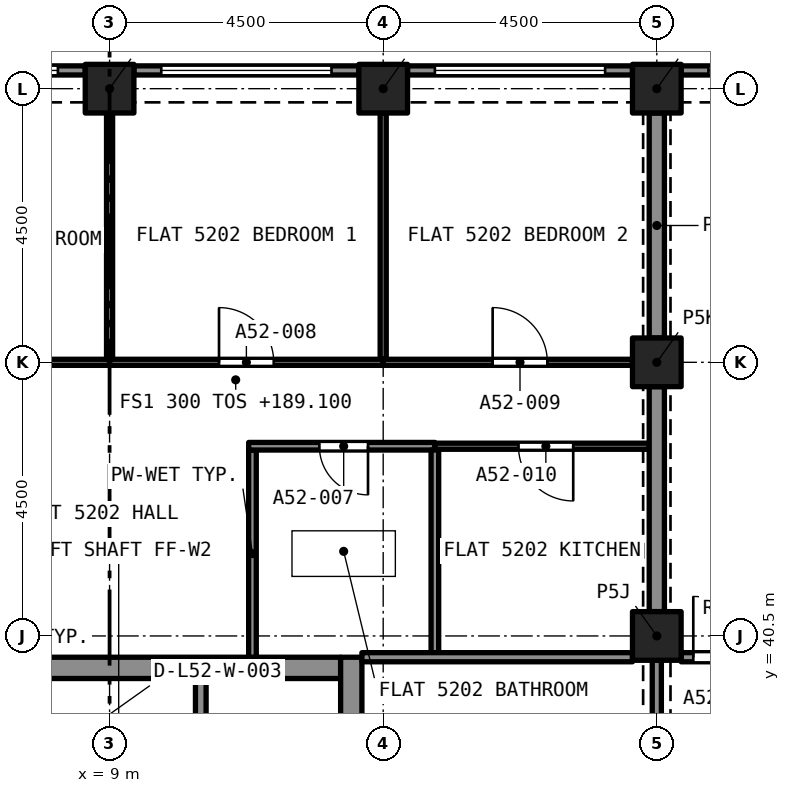
"""IFC4 building model, lengths in metres.
Left out: names, types, materials, properties, quantities, classifications, styles, units other than length and angle.
Written with IfcOpenShell. Run it as: python <this file> out.ifc"""

import sys

from ifc_helpers import new_model, si_unit, direction, frame, frame_2d, origin, origin_2d, place, context, subcontext, project, spatial, rectangle, extrude, element, fill, save


model = new_model("IFC4")
c1 = context("Model", 3, precision=1e-05, world=origin(), true_north=direction((0.0, 1.0)))
c2 = subcontext(c1, "Body", "Model", "MODEL_VIEW")
j1 = project(units=[si_unit("LENGTHUNIT", "METRE"), si_unit("PLANEANGLEUNIT", "RADIAN")], contexts=[c1])
p1 = place(None, origin())
s1 = spatial("IfcSite", under=j1, at=p1, CompositionType="ELEMENT")
p2 = place(p1, origin())
s2 = spatial("IfcBuilding", under=s1, at=p2, CompositionType="ELEMENT")
p3 = place(p2, frame((0.0, 0.0, 189.1)))
s3 = spatial("IfcBuildingStorey", under=s2, at=p3, CompositionType="ELEMENT", Elevation=189.1)
for number, where, z_axis, x_axis in (
    (1, (18.0, 40.5, 0.0), (0.0, 0.0, 1.0), (1.0, 0.0, 0.0)),
    (2, (18.0, 45.0, 0.0), (0.0, 0.0, 1.0), (1.0, 0.0, 0.0)),
    (3, (9.0, 49.5, 0.0), (0.0, 0.0, 1.0), (1.0, 0.0, 0.0)),
    (4, (13.5, 49.5, 0.0), (0.0, 0.0, 1.0), (1.0, 0.0, 0.0)),
    (5, (18.0, 49.5, 0.0), (0.0, 0.0, 1.0), (1.0, 0.0, 0.0)),
):
    element("IfcColumn", number, at=place(p3, frame(where, z_axis=z_axis, x_axis=x_axis)), inside=s3, PredefinedType="COLUMN", context=c2, shape_type="SweptSolid", body=[
        extrude(rectangle(XDim=0.8, YDim=0.8, at=origin_2d()), origin(), (0.0, 0.0, 1.0), 3.2),
    ])
p4 = place(p3, frame((5.2, 39.975, 0.0), z_axis=(0.0, 0.0, 1.0), x_axis=(1.0, 0.0, 0.0)))
e6 = element("IfcWall", 6, at=p4, inside=s3, PredefinedType="SOLIDWALL", context=c2, shape_type="SweptSolid", body=[
    extrude(rectangle(XDim=7.6, YDim=0.35, at=frame_2d((3.8, 0.0))), origin(), (0.0, 0.0, 1.0), 3.2),
])
p5 = place(p3, frame((12.975, 27.35, 0.0), z_axis=(0.0, 0.0, 1.0), x_axis=(0.0, 1.0, 0.0)))
e7 = element("IfcWall", 7, at=p5, inside=s3, PredefinedType="SOLIDWALL", context=c2, shape_type="SweptSolid", body=[
    extrude(rectangle(XDim=12.8, YDim=0.35, at=frame_2d((6.4, 0.0))), origin(), (0.0, 0.0, 1.0), 3.2),
])
p6 = place(p5, frame((10.75, 0.0, 0.0)))
e8 = element("IfcOpeningElement", 8, at=p6, cuts=e7, PredefinedType="OPENING", context=c2, shape_type="SweptSolid", body=[
    extrude(rectangle(XDim=1.1, YDim=2.1, at=frame_2d((0.55, 1.05))), frame((0.0, 0.185, 0.0), z_axis=(0.0, -1.0, 0.0), x_axis=(1.0, 0.0, 0.0)), (0.0, 0.0, 1.0), 0.37),
])
p7 = place(p5, frame((8.6, 0.0, 0.0)))
e9 = element("IfcOpeningElement", 9, at=p7, cuts=e7, PredefinedType="OPENING", context=c2, shape_type="SweptSolid", body=[
    extrude(rectangle(XDim=1.2, YDim=2.1, at=frame_2d((0.6, 1.05))), frame((0.0, 0.185, 0.0), z_axis=(0.0, -1.0, 0.0), x_axis=(1.0, 0.0, 0.0)), (0.0, 0.0, 1.0), 0.37),
])
p8 = place(p3, frame((18.4, 49.8, 0.0), z_axis=(0.0, 0.0, 1.0), x_axis=(1.0, 0.0, 0.0)))
e10 = element("IfcWall", 10, at=p8, inside=s3, PredefinedType="SOLIDWALL", context=c2, shape_type="SweptSolid", body=[
    extrude(rectangle(XDim=3.7, YDim=0.15, at=frame_2d((1.85, 0.0))), origin(), (0.0, 0.0, 1.0), 3.2),
])
p9 = place(p8, frame((0.45, 0.0, 0.45)))
e11 = element("IfcOpeningElement", 11, at=p9, cuts=e10, PredefinedType="OPENING", context=c2, shape_type="SweptSolid", body=[
    extrude(rectangle(XDim=2.8, YDim=1.95, at=frame_2d((1.4, 0.975))), frame((0.0, 0.085, 0.0), z_axis=(0.0, -1.0, 0.0), x_axis=(1.0, 0.0, 0.0)), (0.0, 0.0, 1.0), 0.17),
])
p10 = place(p3, frame((13.9, 49.8, 0.0), z_axis=(0.0, 0.0, 1.0), x_axis=(1.0, 0.0, 0.0)))
e12 = element("IfcWall", 12, at=p10, inside=s3, PredefinedType="SOLIDWALL", context=c2, shape_type="SweptSolid", body=[
    extrude(rectangle(XDim=3.7, YDim=0.15, at=frame_2d((1.85, 0.0))), origin(), (0.0, 0.0, 1.0), 3.2),
])
p11 = place(p10, frame((0.45, 0.0, 0.45)))
e13 = element("IfcOpeningElement", 13, at=p11, cuts=e12, PredefinedType="OPENING", context=c2, shape_type="SweptSolid", body=[
    extrude(rectangle(XDim=2.8, YDim=1.95, at=frame_2d((1.4, 0.975))), frame((0.0, 0.085, 0.0), z_axis=(0.0, -1.0, 0.0), x_axis=(1.0, 0.0, 0.0)), (0.0, 0.0, 1.0), 0.17),
])
p12 = place(p3, frame((9.4, 49.8, 0.0), z_axis=(0.0, 0.0, 1.0), x_axis=(1.0, 0.0, 0.0)))
e14 = element("IfcWall", 14, at=p12, inside=s3, PredefinedType="SOLIDWALL", context=c2, shape_type="SweptSolid", body=[
    extrude(rectangle(XDim=3.7, YDim=0.15, at=frame_2d((1.85, 0.0))), origin(), (0.0, 0.0, 1.0), 3.2),
])
p13 = place(p12, frame((0.45, 0.0, 0.45)))
e15 = element("IfcOpeningElement", 15, at=p13, cuts=e14, PredefinedType="OPENING", context=c2, shape_type="SweptSolid", body=[
    extrude(rectangle(XDim=2.8, YDim=1.95, at=frame_2d((1.4, 0.975))), frame((0.0, 0.085, 0.0), z_axis=(0.0, -1.0, 0.0), x_axis=(1.0, 0.0, 0.0)), (0.0, 0.0, 1.0), 0.17),
])
p14 = place(p3, frame((4.9, 49.8, 0.0), z_axis=(0.0, 0.0, 1.0), x_axis=(1.0, 0.0, 0.0)))
e16 = element("IfcWall", 16, at=p14, inside=s3, PredefinedType="SOLIDWALL", context=c2, shape_type="SweptSolid", body=[
    extrude(rectangle(XDim=3.7, YDim=0.15, at=frame_2d((1.85, 0.0))), origin(), (0.0, 0.0, 1.0), 3.2),
])
p15 = place(p14, frame((0.45, 0.0, 0.45)))
e17 = element("IfcOpeningElement", 17, at=p15, cuts=e16, PredefinedType="OPENING", context=c2, shape_type="SweptSolid", body=[
    extrude(rectangle(XDim=2.8, YDim=1.95, at=frame_2d((1.4, 0.975))), frame((0.0, 0.085, 0.0), z_axis=(0.0, -1.0, 0.0), x_axis=(1.0, 0.0, 0.0)), (0.0, 0.0, 1.0), 0.17),
])
p16 = place(p3, frame((11.35, 40.15, 0.0), z_axis=(0.0, 0.0, 1.0), x_axis=(0.0, 1.0, 0.0)))
e18 = element("IfcWall", 18, at=p16, inside=s3, PredefinedType="PARTITIONING", context=c2, shape_type="SweptSolid", body=[
    extrude(rectangle(XDim=3.408, YDim=0.125, at=frame_2d((1.704, 0.0))), origin(), (0.0, 0.0, 1.0), 2.9),
])
p17 = place(p3, frame((14.35, 43.62, 0.0), z_axis=(0.0, 0.0, 1.0), x_axis=(-1.0, 0.0, 0.0)))
e19 = element("IfcWall", 19, at=p17, inside=s3, PredefinedType="PARTITIONING", context=c2, shape_type="SweptSolid", body=[
    extrude(rectangle(XDim=3.063, YDim=0.125, at=frame_2d((1.531, 0.0))), origin(), (0.0, 0.0, 1.0), 2.9),
])
p18 = place(p17, frame((1.1, 0.0, 0.0)))
e20 = element("IfcOpeningElement", 20, at=p18, cuts=e19, PredefinedType="OPENING", context=c2, shape_type="SweptSolid", body=[
    extrude(rectangle(XDim=0.8, YDim=2.1, at=frame_2d((0.4, 1.05))), frame((0.0, 0.073, 0.0), z_axis=(0.0, -1.0, 0.0), x_axis=(1.0, 0.0, 0.0)), (0.0, 0.0, 1.0), 0.145),
])
p19 = place(p3, frame((14.35, 40.225, 0.0), z_axis=(0.0, 0.0, 1.0), x_axis=(0.0, 1.0, 0.0)))
e21 = element("IfcWall", 21, at=p19, inside=s3, PredefinedType="PARTITIONING", context=c2, shape_type="SweptSolid", body=[
    extrude(rectangle(XDim=3.333, YDim=0.125, at=frame_2d((1.666, 0.0))), origin(), (0.0, 0.0, 1.0), 2.9),
])
p20 = place(p3, frame((13.15, 40.15, 0.0), z_axis=(0.0, 0.0, 1.0), x_axis=(1.0, 0.0, 0.0)))
e22 = element("IfcWall", 22, at=p20, inside=s3, PredefinedType="PARTITIONING", context=c2, shape_type="SweptSolid", body=[
    extrude(rectangle(XDim=4.45, YDim=0.15, at=frame_2d((2.225, 0.0))), origin(), (0.0, 0.0, 1.0), 2.9),
])
p21 = place(p3, frame((13.5, 45.05, 0.0), z_axis=(0.0, 0.0, 1.0), x_axis=(0.0, 1.0, 0.0)))
e23 = element("IfcWall", 23, at=p21, inside=s3, PredefinedType="PARTITIONING", context=c2, shape_type="SweptSolid", body=[
    extrude(rectangle(XDim=4.05, YDim=0.1, at=frame_2d((2.025, 0.0))), origin(), (0.0, 0.0, 1.0), 2.9),
])
p22 = place(p3, frame((9.0, 45.0, 0.0), z_axis=(0.0, 0.0, 1.0), x_axis=(1.0, 0.0, 0.0)))
e24 = element("IfcWall", 24, at=p22, inside=s3, PredefinedType="PARTITIONING", context=c2, shape_type="SweptSolid", body=[
    extrude(rectangle(XDim=4.5, YDim=0.1, at=frame_2d((2.25, 0.0))), origin(), (0.0, 0.0, 1.0), 2.9),
])
p23 = place(p22, frame((1.8, 0.0, 0.0)))
e25 = element("IfcOpeningElement", 25, at=p23, cuts=e24, PredefinedType="OPENING", context=c2, shape_type="SweptSolid", body=[
    extrude(rectangle(XDim=0.9, YDim=2.1, at=frame_2d((0.45, 1.05))), frame((0.0, 0.06, 0.0), z_axis=(0.0, -1.0, 0.0), x_axis=(1.0, 0.0, 0.0)), (0.0, 0.0, 1.0), 0.12),
])
p24 = place(p3, frame((9.0, 45.05, 0.0), z_axis=(0.0, 0.0, 1.0), x_axis=(0.0, 1.0, 0.0)))
e26 = element("IfcWall", 26, at=p24, inside=s3, PredefinedType="PARTITIONING", context=c2, shape_type="SweptSolid", body=[
    extrude(rectangle(XDim=4.05, YDim=0.1, at=frame_2d((2.025, 0.0))), origin(), (0.0, 0.0, 1.0), 2.9),
])
p25 = place(p3, frame((13.5, 45.0, 0.0), z_axis=(0.0, 0.0, 1.0), x_axis=(1.0, 0.0, 0.0)))
e27 = element("IfcWall", 27, at=p25, inside=s3, PredefinedType="PARTITIONING", context=c2, shape_type="SweptSolid", body=[
    extrude(rectangle(XDim=4.1, YDim=0.1, at=frame_2d((2.05, 0.0))), origin(), (0.0, 0.0, 1.0), 2.9),
])
p26 = place(p25, frame((1.8, 0.0, 0.0)))
e28 = element("IfcOpeningElement", 28, at=p26, cuts=e27, PredefinedType="OPENING", context=c2, shape_type="SweptSolid", body=[
    extrude(rectangle(XDim=0.9, YDim=2.1, at=frame_2d((0.45, 1.05))), frame((0.0, 0.06, 0.0), z_axis=(0.0, -1.0, 0.0), x_axis=(1.0, 0.0, 0.0)), (0.0, 0.0, 1.0), 0.12),
])
p27 = place(p3, frame((18.0, 45.4, 0.0), z_axis=(0.0, 0.0, 1.0), x_axis=(0.0, 1.0, 0.0)))
e29 = element("IfcWall", 29, at=p27, inside=s3, PredefinedType="PARTITIONING", context=c2, shape_type="SweptSolid", body=[
    extrude(rectangle(XDim=3.7, YDim=0.25, at=frame_2d((1.85, 0.0))), origin(), (0.0, 0.0, 1.0), 2.38),
])
p28 = place(p3, frame((17.875, 43.62, 0.0), z_axis=(0.0, 0.0, 1.0), x_axis=(-1.0, 0.0, 0.0)))
e30 = element("IfcWall", 30, at=p28, inside=s3, PredefinedType="PARTITIONING", context=c2, shape_type="SweptSolid", body=[
    extrude(rectangle(XDim=3.525, YDim=0.1, at=frame_2d((1.762, 0.0))), origin(), (0.0, 0.0, 1.0), 2.9),
])
p29 = place(p28, frame((1.25, 0.0, 0.0)))
e31 = element("IfcOpeningElement", 31, at=p29, cuts=e30, PredefinedType="OPENING", context=c2, shape_type="SweptSolid", body=[
    extrude(rectangle(XDim=0.9, YDim=2.1, at=frame_2d((0.45, 1.05))), frame((0.0, 0.06, 0.0), z_axis=(0.0, -1.0, 0.0), x_axis=(1.0, 0.0, 0.0)), (0.0, 0.0, 1.0), 0.12),
])
p30 = place(p3, frame((0.433, 45.0, 0.0), z_axis=(0.0, 0.0, 1.0), x_axis=(1.0, 0.0, 0.0)))
e32 = element("IfcWall", 32, at=p30, inside=s3, PredefinedType="PARTITIONING", context=c2, shape_type="SweptSolid", body=[
    extrude(rectangle(XDim=8.567, YDim=0.1, at=frame_2d((4.284, 0.0))), origin(), (0.0, 0.0, 1.0), 2.9),
])
p31 = place(p30, frame((3.467, 0.0, 0.0)))
e33 = element("IfcOpeningElement", 33, at=p31, cuts=e32, PredefinedType="OPENING", context=c2, shape_type="SweptSolid", body=[
    extrude(rectangle(XDim=1.6, YDim=2.1, at=frame_2d((0.8, 1.05))), frame((0.0, 0.06, 0.0), z_axis=(0.0, -1.0, 0.0), x_axis=(1.0, 0.0, 0.0)), (0.0, 0.0, 1.0), 0.12),
])
p32 = place(p3, frame((18.0, 40.9, 0.0), z_axis=(0.0, 0.0, 1.0), x_axis=(0.0, 1.0, 0.0)))
e34 = element("IfcWall", 34, at=p32, inside=s3, PredefinedType="PARTITIONING", context=c2, shape_type="SweptSolid", body=[
    extrude(rectangle(XDim=3.7, YDim=0.25, at=frame_2d((1.85, 0.0))), origin(), (0.0, 0.0, 1.0), 2.38),
])
p33 = place(p3, frame((18.4, 40.15, 0.0), z_axis=(0.0, 0.0, 1.0), x_axis=(1.0, 0.0, 0.0)))
e35 = element("IfcWall", 35, at=p33, inside=s3, PredefinedType="PARTITIONING", context=c2, shape_type="SweptSolid", body=[
    extrude(rectangle(XDim=2.2, YDim=0.15, at=frame_2d((1.1, 0.0))), origin(), (0.0, 0.0, 1.0), 2.75),
])
p34 = place(p33, frame((0.2, 0.0, 0.0)))
e36 = element("IfcOpeningElement", 36, at=p34, cuts=e35, PredefinedType="OPENING", context=c2, shape_type="SweptSolid", body=[
    extrude(rectangle(XDim=1.0, YDim=2.1, at=frame_2d((0.5, 1.05))), frame((0.0, 0.085, 0.0), z_axis=(0.0, -1.0, 0.0), x_axis=(1.0, 0.0, 0.0)), (0.0, 0.0, 1.0), 0.17),
])
p35 = place(p3, frame((18.0, 40.1, 0.0), z_axis=(0.0, 0.0, 1.0), x_axis=(0.0, -1.0, 0.0)))
e37 = element("IfcWall", 37, at=p35, inside=s3, PredefinedType="PARTITIONING", context=c2, shape_type="SweptSolid", body=[
    extrude(rectangle(XDim=3.7, YDim=0.15, at=frame_2d((1.85, 0.0))), origin(), (0.0, 0.0, 1.0), 2.38),
])
p36 = place(p35, frame((1.25, 0.0, 0.0)))
e38 = element("IfcOpeningElement", 38, at=p36, cuts=e37, PredefinedType="OPENING", context=c2, shape_type="SweptSolid", body=[
    extrude(rectangle(XDim=1.2, YDim=2.1, at=frame_2d((0.6, 1.05))), frame((0.0, 0.085, 0.0), z_axis=(0.0, -1.0, 0.0), x_axis=(1.0, 0.0, 0.0)), (0.0, 0.0, 1.0), 0.17),
])
p37 = place(p3, frame((10.5, 37.5, 0.0), z_axis=(0.0, 0.0, 1.0), x_axis=(0.0, 1.0, 0.0)))
e39 = element("IfcWall", 39, at=p37, inside=s3, PredefinedType="SOLIDWALL", context=c2, shape_type="SweptSolid", body=[
    extrude(rectangle(XDim=2.3, YDim=0.175, at=frame_2d((1.15, 0.0))), origin(), (0.0, 0.0, 1.0), 2.9),
])
p38 = place(p37, frame((0.65, 0.0, 0.0)))
e40 = element("IfcOpeningElement", 40, at=p38, cuts=e39, PredefinedType="OPENING", context=c2, shape_type="SweptSolid", body=[
    extrude(rectangle(XDim=1.0, YDim=2.1, at=frame_2d((0.5, 1.05))), frame((0.0, 0.097, 0.0), z_axis=(0.0, -1.0, 0.0), x_axis=(1.0, 0.0, 0.0)), (0.0, 0.0, 1.0), 0.195),
])
p39 = place(p9, origin())
e41 = element("IfcWindow", 41, at=p39, inside=s3, PartitioningType="SINGLE_PANEL", PredefinedType="WINDOW", context=c2, shape_type="SweptSolid", body=[
    extrude(rectangle(XDim=2.8, YDim=1.95, at=frame_2d((1.4, 0.975))), frame((0.0, 0.03, 0.0), z_axis=(0.0, -1.0, 0.0), x_axis=(1.0, 0.0, 0.0)), (0.0, 0.0, 1.0), 0.06),
])
fill(e11, e41)
p40 = place(p11, origin())
e42 = element("IfcWindow", 42, at=p40, inside=s3, PartitioningType="SINGLE_PANEL", PredefinedType="WINDOW", context=c2, shape_type="SweptSolid", body=[
    extrude(rectangle(XDim=2.8, YDim=1.95, at=frame_2d((1.4, 0.975))), frame((0.0, 0.03, 0.0), z_axis=(0.0, -1.0, 0.0), x_axis=(1.0, 0.0, 0.0)), (0.0, 0.0, 1.0), 0.06),
])
fill(e13, e42)
p41 = place(p13, origin())
e43 = element("IfcWindow", 43, at=p41, inside=s3, PartitioningType="SINGLE_PANEL", PredefinedType="WINDOW", context=c2, shape_type="SweptSolid", body=[
    extrude(rectangle(XDim=2.8, YDim=1.95, at=frame_2d((1.4, 0.975))), frame((0.0, 0.03, 0.0), z_axis=(0.0, -1.0, 0.0), x_axis=(1.0, 0.0, 0.0)), (0.0, 0.0, 1.0), 0.06),
])
fill(e15, e43)
p42 = place(p15, origin())
e44 = element("IfcWindow", 44, at=p42, inside=s3, PartitioningType="SINGLE_PANEL", PredefinedType="WINDOW", context=c2, shape_type="SweptSolid", body=[
    extrude(rectangle(XDim=2.8, YDim=1.95, at=frame_2d((1.4, 0.975))), frame((0.0, 0.03, 0.0), z_axis=(0.0, -1.0, 0.0), x_axis=(1.0, 0.0, 0.0)), (0.0, 0.0, 1.0), 0.06),
])
fill(e17, e44)
p43 = place(p18, origin())
e45 = element("IfcDoor", 45, at=p43, inside=s3, OperationType="SINGLE_SWING_LEFT", PredefinedType="DOOR", context=c2, shape_type="SweptSolid", body=[
    extrude(rectangle(XDim=0.8, YDim=2.1, at=frame_2d((0.4, 1.05))), frame((0.0, 0.025, 0.0), z_axis=(0.0, -1.0, 0.0), x_axis=(1.0, 0.0, 0.0)), (0.0, 0.0, 1.0), 0.05),
])
fill(e20, e45)
p44 = place(p23, origin())
e46 = element("IfcDoor", 46, at=p44, inside=s3, OperationType="SINGLE_SWING_LEFT", PredefinedType="DOOR", context=c2, shape_type="SweptSolid", body=[
    extrude(rectangle(XDim=0.9, YDim=2.1, at=frame_2d((0.45, 1.05))), frame((0.0, 0.025, 0.0), z_axis=(0.0, -1.0, 0.0), x_axis=(1.0, 0.0, 0.0)), (0.0, 0.0, 1.0), 0.05),
])
fill(e25, e46)
p45 = place(p26, origin())
e47 = element("IfcDoor", 47, at=p45, inside=s3, OperationType="SINGLE_SWING_RIGHT", PredefinedType="DOOR", context=c2, shape_type="SweptSolid", body=[
    extrude(rectangle(XDim=0.9, YDim=2.1, at=frame_2d((0.45, 1.05))), frame((0.0, 0.025, 0.0), z_axis=(0.0, -1.0, 0.0), x_axis=(1.0, 0.0, 0.0)), (0.0, 0.0, 1.0), 0.05),
])
fill(e28, e47)
p46 = place(p29, origin())
e48 = element("IfcDoor", 48, at=p46, inside=s3, OperationType="SINGLE_SWING_LEFT", PredefinedType="DOOR", context=c2, shape_type="SweptSolid", body=[
    extrude(rectangle(XDim=0.9, YDim=2.1, at=frame_2d((0.45, 1.05))), frame((0.0, 0.025, 0.0), z_axis=(0.0, -1.0, 0.0), x_axis=(1.0, 0.0, 0.0)), (0.0, 0.0, 1.0), 0.05),
])
fill(e31, e48)
p47 = place(p34, origin())
e49 = element("IfcDoor", 49, at=p47, inside=s3, OperationType="SINGLE_SWING_LEFT", PredefinedType="DOOR", context=c2, shape_type="SweptSolid", body=[
    extrude(rectangle(XDim=1.0, YDim=2.1, at=frame_2d((0.5, 1.05))), frame((0.0, 0.025, 0.0), z_axis=(0.0, -1.0, 0.0), x_axis=(1.0, 0.0, 0.0)), (0.0, 0.0, 1.0), 0.05),
])
fill(e36, e49)
save(model, sys.argv[1])
